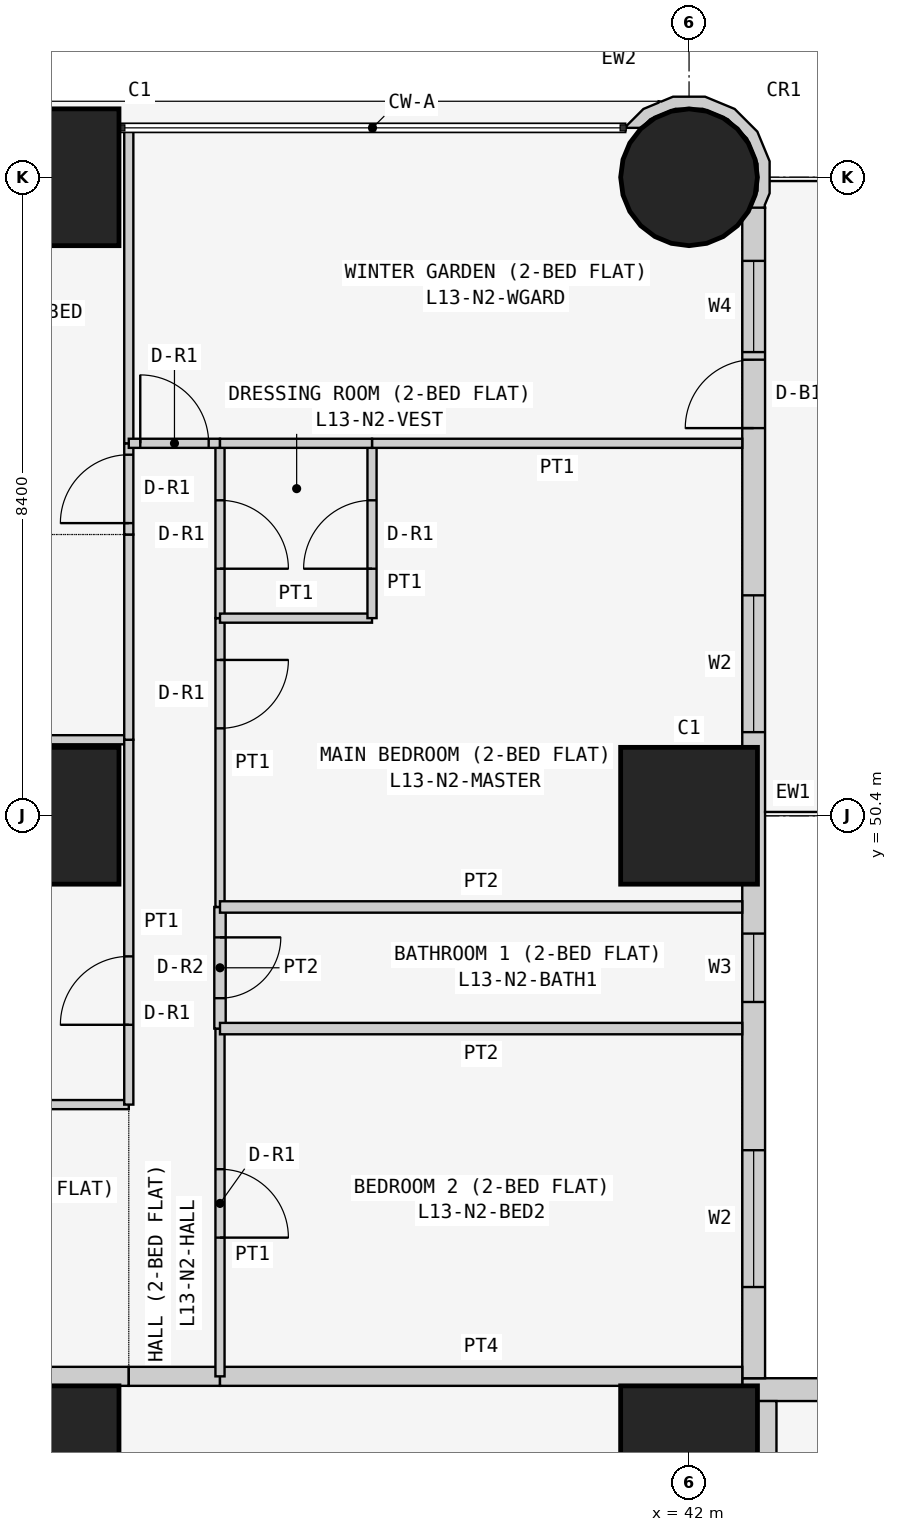
"""IFC4 building model, lengths in metres.
Left out: names, types, materials, properties, quantities, classifications, styles, units other than length and angle.
Written with IfcOpenShell. Run it as: python <this file> out.ifc"""

import sys

from ifc_helpers import new_model, si_unit, direction, frame, frame_2d, origin, origin_2d, place, context, subcontext, project, spatial, polyline, rectangle, circle, outline, extrude, element, fill, save


model = new_model("IFC4")
c1 = context("Model", 3, precision=1e-05, world=origin(), true_north=direction((0.0, 1.0)))
c2 = subcontext(c1, "Body", "Model", "MODEL_VIEW")
j1 = project(units=[si_unit("LENGTHUNIT", "METRE"), si_unit("PLANEANGLEUNIT", "RADIAN")], contexts=[c1])
p1 = place(None, origin())
s1 = spatial("IfcSite", under=j1, at=p1, CompositionType="ELEMENT")
p2 = place(p1, origin())
s2 = spatial("IfcBuilding", under=s1, at=p2, CompositionType="ELEMENT")
p3 = place(p2, frame((0.0, 0.0, 56.1)))
s3 = spatial("IfcBuildingStorey", under=s2, at=p3, CompositionType="ELEMENT", Elevation=56.1)
for number, where, z_axis, x_axis in (
    (1, (33.6, 42.0, 0.0), (0.0, 0.0, 1.0), (1.0, 0.0, 0.0)),
    (2, (33.6, 50.4, 0.0), (0.0, 0.0, 1.0), (1.0, 0.0, 0.0)),
    (3, (33.6, 58.8, 0.0), (0.0, 0.0, 1.0), (1.0, 0.0, 0.0)),
    (4, (42.0, 42.0, 0.0), (0.0, 0.0, 1.0), (1.0, 0.0, 0.0)),
    (5, (42.0, 50.4, 0.0), (0.0, 0.0, 1.0), (1.0, 0.0, 0.0)),
):
    element("IfcColumn", number, at=place(p3, frame(where, z_axis=z_axis, x_axis=x_axis)), inside=s3, PredefinedType="COLUMN", context=c2, shape_type="SweptSolid", body=[
        extrude(rectangle(XDim=1.8, YDim=1.8, at=origin_2d()), origin(), (0.0, 0.0, 1.0), 3.6),
    ])
p4 = place(p3, frame((42.0, 58.8, 0.0), z_axis=(0.0, 0.0, 1.0), x_axis=(1.0, 0.0, 0.0)))
e6 = element("IfcColumn", 6, at=p4, inside=s3, PredefinedType="COLUMN", context=c2, shape_type="SweptSolid", body=[
    extrude(circle(Radius=0.9, at=origin_2d()), origin(), (0.0, 0.0, 1.0), 3.6),
])
p5 = place(p3, frame((58.4, 42.85, 0.0), z_axis=(0.0, 0.0, 1.0), x_axis=(-1.0, 0.0, 0.0)))
e7 = element("IfcWall", 7, at=p5, inside=s3, PredefinedType="SOLIDWALL", context=c2, shape_type="SweptSolid", body=[
    extrude(rectangle(XDim=15.7, YDim=0.3, at=frame_2d((7.85, 0.0))), origin(), (0.0, 0.0, 1.0), 3.45),
])
p6 = place(p5, frame((12.4, 0.0, 0.9)))
e8 = element("IfcOpeningElement", 8, at=p6, cuts=e7, PredefinedType="OPENING", context=c2, shape_type="SweptSolid", body=[
    extrude(rectangle(XDim=1.8, YDim=1.5, at=frame_2d((0.9, 0.75))), frame((0.0, 0.16, 0.0), z_axis=(0.0, -1.0, 0.0), x_axis=(1.0, 0.0, 0.0)), (0.0, 0.0, 1.0), 0.32),
])
p7 = place(p5, frame((9.55, 0.0, 1.5)))
e9 = element("IfcOpeningElement", 9, at=p7, cuts=e7, PredefinedType="OPENING", context=c2, shape_type="SweptSolid", body=[
    extrude(rectangle(XDim=0.9, YDim=0.7, at=frame_2d((0.45, 0.35))), frame((0.0, 0.16, 0.0), z_axis=(0.0, -1.0, 0.0), x_axis=(1.0, 0.0, 0.0)), (0.0, 0.0, 1.0), 0.32),
])
p8 = place(p5, frame((5.1, 0.0, 0.9)))
e10 = element("IfcOpeningElement", 10, at=p8, cuts=e7, PredefinedType="OPENING", context=c2, shape_type="SweptSolid", body=[
    extrude(rectangle(XDim=1.8, YDim=1.5, at=frame_2d((0.9, 0.75))), frame((0.0, 0.16, 0.0), z_axis=(0.0, -1.0, 0.0), x_axis=(1.0, 0.0, 0.0)), (0.0, 0.0, 1.0), 0.32),
])
p9 = place(p5, frame((2.0, 0.0, 0.0)))
e11 = element("IfcOpeningElement", 11, at=p9, cuts=e7, PredefinedType="OPENING", context=c2, shape_type="SweptSolid", body=[
    extrude(rectangle(XDim=0.9, YDim=2.4, at=frame_2d((0.45, 1.2))), frame((0.0, 0.16, 0.0), z_axis=(0.0, -1.0, 0.0), x_axis=(1.0, 0.0, 0.0)), (0.0, 0.0, 1.0), 0.32),
])
p10 = place(p5, frame((0.7, 0.0, 0.9)))
e12 = element("IfcOpeningElement", 12, at=p10, cuts=e7, PredefinedType="OPENING", context=c2, shape_type="SweptSolid", body=[
    extrude(rectangle(XDim=1.2, YDim=1.5, at=frame_2d((0.6, 0.75))), frame((0.0, 0.16, 0.0), z_axis=(0.0, -1.0, 0.0), x_axis=(1.0, 0.0, 0.0)), (0.0, 0.0, 1.0), 0.32),
])
p11 = place(p3, frame((42.85, 43.0, 0.0), z_axis=(0.0, 0.0, 1.0), x_axis=(0.0, 1.0, 0.0)))
e13 = element("IfcWall", 13, at=p11, inside=s3, PredefinedType="SOLIDWALL", context=c2, shape_type="SweptSolid", body=[
    extrude(rectangle(XDim=15.4, YDim=0.3, at=frame_2d((7.7, 0.0))), origin(), (0.0, 0.0, 1.0), 3.45),
])
p12 = place(p11, frame((1.2, 0.0, 0.9)))
e14 = element("IfcOpeningElement", 14, at=p12, cuts=e13, PredefinedType="OPENING", context=c2, shape_type="SweptSolid", body=[
    extrude(rectangle(XDim=1.8, YDim=1.5, at=frame_2d((0.9, 0.75))), frame((0.0, 0.16, 0.0), z_axis=(0.0, -1.0, 0.0), x_axis=(1.0, 0.0, 0.0)), (0.0, 0.0, 1.0), 0.32),
])
p13 = place(p11, frame((4.95, 0.0, 1.5)))
e15 = element("IfcOpeningElement", 15, at=p13, cuts=e13, PredefinedType="OPENING", context=c2, shape_type="SweptSolid", body=[
    extrude(rectangle(XDim=0.9, YDim=0.7, at=frame_2d((0.45, 0.35))), frame((0.0, 0.16, 0.0), z_axis=(0.0, -1.0, 0.0), x_axis=(1.0, 0.0, 0.0)), (0.0, 0.0, 1.0), 0.32),
])
p14 = place(p11, frame((8.5, 0.0, 0.9)))
e16 = element("IfcOpeningElement", 16, at=p14, cuts=e13, PredefinedType="OPENING", context=c2, shape_type="SweptSolid", body=[
    extrude(rectangle(XDim=1.8, YDim=1.5, at=frame_2d((0.9, 0.75))), frame((0.0, 0.16, 0.0), z_axis=(0.0, -1.0, 0.0), x_axis=(1.0, 0.0, 0.0)), (0.0, 0.0, 1.0), 0.32),
])
p15 = place(p11, frame((12.5, 0.0, 0.0)))
e17 = element("IfcOpeningElement", 17, at=p15, cuts=e13, PredefinedType="OPENING", context=c2, shape_type="SweptSolid", body=[
    extrude(rectangle(XDim=0.9, YDim=2.4, at=frame_2d((0.45, 1.2))), frame((0.0, 0.16, 0.0), z_axis=(0.0, -1.0, 0.0), x_axis=(1.0, 0.0, 0.0)), (0.0, 0.0, 1.0), 0.32),
])
p16 = place(p11, frame((13.5, 0.0, 0.9)))
e18 = element("IfcOpeningElement", 18, at=p16, cuts=e13, PredefinedType="OPENING", context=c2, shape_type="SweptSolid", body=[
    extrude(rectangle(XDim=1.2, YDim=1.5, at=frame_2d((0.6, 0.75))), frame((0.0, 0.16, 0.0), z_axis=(0.0, -1.0, 0.0), x_axis=(1.0, 0.0, 0.0)), (0.0, 0.0, 1.0), 0.32),
])
p17 = place(p3, frame((42.91, 58.436, 0.0), z_axis=(0.0, 0.0, 1.0), x_axis=(0.377204953059, 0.926129809145, 0.0)))
e19 = element("IfcWall", 19, at=p17, inside=s3, PredefinedType="SOLIDWALL", context=c2, shape_type="SweptSolid", body=[
    extrude(outline(polyline([(0.769, 1.728), (0.75, 1.723), (0.6, 1.875), (0.295, 2.004), (0.281, 1.998), (0.36, 1.803), (0.509, 1.741), (0.761, 1.486), (0.896, 1.154), (0.894, 0.795), (0.755, 0.465), (0.5, 0.213), (0.168, 0.078), (-0.1, 0.08), (0.001, -0.097), (0.03, -0.08), (0.198, -0.081), (0.589, 0.078), (0.889, 0.374), (1.052, 0.763), (1.055, 1.185), (0.896, 1.575), (0.778, 1.695), (0.769, 1.728)])), origin(), (0.0, 0.0, 1.0), 3.45),
])
p18 = place(p3, frame((29.4, 43.025, 0.0), z_axis=(0.0, 0.0, 1.0), x_axis=(1.0, 0.0, 0.0)))
e20 = element("IfcWall", 20, at=p18, inside=s3, PredefinedType="PARTITIONING", context=c2, shape_type="SweptSolid", body=[
    extrude(rectangle(XDim=5.229, YDim=0.25, at=frame_2d((2.615, 0.0))), origin(), (0.0, 0.0, 1.0), 3.45),
])
p19 = place(p18, frame((2.1, 0.0, 0.0)))
e21 = element("IfcOpeningElement", 21, at=p19, cuts=e20, PredefinedType="OPENING", context=c2, shape_type="SweptSolid", body=[
    extrude(rectangle(XDim=1.0, YDim=2.1, at=frame_2d((0.5, 1.05))), frame((0.0, 0.135, 0.0), z_axis=(0.0, -1.0, 0.0), x_axis=(1.0, 0.0, 0.0)), (0.0, 0.0, 1.0), 0.27),
])
p20 = place(p3, frame((34.629, 43.025, 0.0), z_axis=(0.0, 0.0, 1.0), x_axis=(1.0, 0.0, 0.0)))
e22 = element("IfcWall", 22, at=p20, inside=s3, PredefinedType="PARTITIONING", context=c2, shape_type="SweptSolid", body=[
    extrude(rectangle(XDim=1.2, YDim=0.25, at=frame_2d((0.6, 0.0))), origin(), (0.0, 0.0, 1.0), 3.45),
])
for number, where, z_axis, x_axis in (
    (23, (35.829, 43.025, 0.0), (0.0, 0.0, 1.0), (1.0, 0.0, 0.0)),
    (24, (43.025, 42.7, 0.0), (0.0, 0.0, 1.0), (0.0, -1.0, 0.0)),
):
    element("IfcWall", number, at=place(p3, frame(where, z_axis=z_axis, x_axis=x_axis)), inside=s3, PredefinedType="PARTITIONING", context=c2, shape_type="SweptSolid", body=[
        extrude(rectangle(XDim=6.871, YDim=0.25, at=frame_2d((3.436, 0.0))), origin(), (0.0, 0.0, 1.0), 3.45),
    ])
for number, where, z_axis, x_axis in (
    (25, (29.4, 46.6, 0.0), (0.0, 0.0, 1.0), (1.0, 0.0, 0.0)),
    (26, (29.4, 51.4, 0.0), (0.0, 0.0, 1.0), (1.0, 0.0, 0.0)),
):
    element("IfcWall", number, at=place(p3, frame(where, z_axis=z_axis, x_axis=x_axis)), inside=s3, PredefinedType="PARTITIONING", context=c2, shape_type="SweptSolid", body=[
        extrude(rectangle(XDim=5.229, YDim=0.12, at=frame_2d((2.615, 0.0))), origin(), (0.0, 0.0, 1.0), 3.45),
    ])
p21 = place(p3, frame((34.629, 51.4, 0.0), z_axis=(0.0, 0.0, 1.0), x_axis=(0.0, -1.0, 0.0)))
e27 = element("IfcWall", 27, at=p21, inside=s3, PredefinedType="PARTITIONING", context=c2, shape_type="SweptSolid", body=[
    extrude(rectangle(XDim=4.8, YDim=0.12, at=frame_2d((2.4, 0.0))), origin(), (0.0, 0.0, 1.0), 3.45),
])
p22 = place(p21, frame((2.85, 0.0, 0.0)))
e28 = element("IfcOpeningElement", 28, at=p22, cuts=e27, PredefinedType="OPENING", context=c2, shape_type="SweptSolid", body=[
    extrude(rectangle(XDim=0.9, YDim=2.1, at=frame_2d((0.45, 1.05))), frame((0.0, 0.07, 0.0), z_axis=(0.0, -1.0, 0.0), x_axis=(1.0, 0.0, 0.0)), (0.0, 0.0, 1.0), 0.14),
])
p23 = place(p3, frame((34.629, 54.1, 0.0), z_axis=(0.0, 0.0, 1.0), x_axis=(0.0, -1.0, 0.0)))
e29 = element("IfcWall", 29, at=p23, inside=s3, PredefinedType="PARTITIONING", context=c2, shape_type="SweptSolid", body=[
    extrude(rectangle(XDim=2.7, YDim=0.12, at=frame_2d((1.35, 0.0))), origin(), (0.0, 0.0, 1.0), 3.45),
])
p24 = place(p3, frame((34.629, 55.3, 0.0), z_axis=(0.0, 0.0, 1.0), x_axis=(0.0, -1.0, 0.0)))
e30 = element("IfcWall", 30, at=p24, inside=s3, PredefinedType="PARTITIONING", context=c2, shape_type="SweptSolid", body=[
    extrude(rectangle(XDim=1.2, YDim=0.12, at=frame_2d((0.6, 0.0))), origin(), (0.0, 0.0, 1.0), 3.45),
])
p25 = place(p24, frame((0.15, 0.0, 0.0)))
e31 = element("IfcOpeningElement", 31, at=p25, cuts=e30, PredefinedType="OPENING", context=c2, shape_type="SweptSolid", body=[
    extrude(rectangle(XDim=0.9, YDim=2.1, at=frame_2d((0.45, 1.05))), frame((0.0, 0.07, 0.0), z_axis=(0.0, -1.0, 0.0), x_axis=(1.0, 0.0, 0.0)), (0.0, 0.0, 1.0), 0.14),
])
p26 = place(p3, frame((34.629, 59.45, 0.0), z_axis=(0.0, 0.0, 1.0), x_axis=(0.0, -1.0, 0.0)))
e32 = element("IfcWall", 32, at=p26, inside=s3, PredefinedType="PARTITIONING", context=c2, shape_type="SweptSolid", body=[
    extrude(rectangle(XDim=4.15, YDim=0.12, at=frame_2d((2.075, 0.0))), origin(), (0.0, 0.0, 1.0), 3.45),
])
p27 = place(p3, frame((35.829, 47.6, 0.0), z_axis=(0.0, 0.0, 1.0), x_axis=(0.0, -1.0, 0.0)))
e33 = element("IfcWall", 33, at=p27, inside=s3, PredefinedType="PARTITIONING", context=c2, shape_type="SweptSolid", body=[
    extrude(rectangle(XDim=4.575, YDim=0.12, at=frame_2d((2.288, 0.0))), origin(), (0.0, 0.0, 1.0), 3.45),
])
p28 = place(p27, frame((1.85, 0.0, 0.0)))
e34 = element("IfcOpeningElement", 34, at=p28, cuts=e33, PredefinedType="OPENING", context=c2, shape_type="SweptSolid", body=[
    extrude(rectangle(XDim=0.9, YDim=2.1, at=frame_2d((0.45, 1.05))), frame((0.0, 0.07, 0.0), z_axis=(0.0, -1.0, 0.0), x_axis=(1.0, 0.0, 0.0)), (0.0, 0.0, 1.0), 0.14),
])
p29 = place(p3, frame((35.829, 49.2, 0.0), z_axis=(0.0, 0.0, 1.0), x_axis=(0.0, -1.0, 0.0)))
e35 = element("IfcWall", 35, at=p29, inside=s3, PredefinedType="PARTITIONING", context=c2, shape_type="SweptSolid", body=[
    extrude(rectangle(XDim=1.6, YDim=0.15, at=frame_2d((0.8, 0.0))), origin(), (0.0, 0.0, 1.0), 3.45),
])
p30 = place(p29, frame((0.4, 0.0, 0.0)))
e36 = element("IfcOpeningElement", 36, at=p30, cuts=e35, PredefinedType="OPENING", context=c2, shape_type="SweptSolid", body=[
    extrude(rectangle(XDim=0.8, YDim=2.1, at=frame_2d((0.4, 1.05))), frame((0.0, 0.085, 0.0), z_axis=(0.0, -1.0, 0.0), x_axis=(1.0, 0.0, 0.0)), (0.0, 0.0, 1.0), 0.17),
])
p31 = place(p3, frame((35.829, 53.0, 0.0), z_axis=(0.0, 0.0, 1.0), x_axis=(0.0, -1.0, 0.0)))
e37 = element("IfcWall", 37, at=p31, inside=s3, PredefinedType="PARTITIONING", context=c2, shape_type="SweptSolid", body=[
    extrude(rectangle(XDim=3.8, YDim=0.12, at=frame_2d((1.9, 0.0))), origin(), (0.0, 0.0, 1.0), 3.45),
])
p32 = place(p31, frame((0.55, 0.0, 0.0)))
e38 = element("IfcOpeningElement", 38, at=p32, cuts=e37, PredefinedType="OPENING", context=c2, shape_type="SweptSolid", body=[
    extrude(rectangle(XDim=0.9, YDim=2.1, at=frame_2d((0.45, 1.05))), frame((0.0, 0.07, 0.0), z_axis=(0.0, -1.0, 0.0), x_axis=(1.0, 0.0, 0.0)), (0.0, 0.0, 1.0), 0.14),
])
p33 = place(p3, frame((35.829, 55.3, 0.0), z_axis=(0.0, 0.0, 1.0), x_axis=(0.0, -1.0, 0.0)))
e39 = element("IfcWall", 39, at=p33, inside=s3, PredefinedType="PARTITIONING", context=c2, shape_type="SweptSolid", body=[
    extrude(rectangle(XDim=2.3, YDim=0.12, at=frame_2d((1.15, 0.0))), origin(), (0.0, 0.0, 1.0), 3.45),
])
p34 = place(p33, frame((0.75, 0.0, 0.0)))
e40 = element("IfcOpeningElement", 40, at=p34, cuts=e39, PredefinedType="OPENING", context=c2, shape_type="SweptSolid", body=[
    extrude(rectangle(XDim=0.9, YDim=2.1, at=frame_2d((0.45, 1.05))), frame((0.0, 0.07, 0.0), z_axis=(0.0, -1.0, 0.0), x_axis=(1.0, 0.0, 0.0)), (0.0, 0.0, 1.0), 0.14),
])
p35 = place(p3, frame((34.629, 55.3, 0.0), z_axis=(0.0, 0.0, 1.0), x_axis=(1.0, 0.0, 0.0)))
e41 = element("IfcWall", 41, at=p35, inside=s3, PredefinedType="PARTITIONING", context=c2, shape_type="SweptSolid", body=[
    extrude(rectangle(XDim=1.2, YDim=0.12, at=frame_2d((0.6, 0.0))), origin(), (0.0, 0.0, 1.0), 3.45),
])
p36 = place(p35, frame((0.151, 0.0, 0.0)))
e42 = element("IfcOpeningElement", 42, at=p36, cuts=e41, PredefinedType="OPENING", context=c2, shape_type="SweptSolid", body=[
    extrude(rectangle(XDim=0.9, YDim=2.1, at=frame_2d((0.45, 1.05))), frame((0.0, 0.07, 0.0), z_axis=(0.0, -1.0, 0.0), x_axis=(1.0, 0.0, 0.0)), (0.0, 0.0, 1.0), 0.14),
])
for number, where, z_axis, x_axis in (
    (43, (35.829, 47.6, 0.0), (0.0, 0.0, 1.0), (1.0, 0.0, 0.0)),
    (44, (35.829, 49.2, 0.0), (0.0, 0.0, 1.0), (1.0, 0.0, 0.0)),
):
    element("IfcWall", number, at=place(p3, frame(where, z_axis=z_axis, x_axis=x_axis)), inside=s3, PredefinedType="PARTITIONING", context=c2, shape_type="SweptSolid", body=[
        extrude(rectangle(XDim=6.871, YDim=0.15, at=frame_2d((3.436, 0.0))), origin(), (0.0, 0.0, 1.0), 3.45),
    ])
p37 = place(p3, frame((35.829, 53.0, 0.0), z_axis=(0.0, 0.0, 1.0), x_axis=(1.0, 0.0, 0.0)))
e45 = element("IfcWall", 45, at=p37, inside=s3, PredefinedType="PARTITIONING", context=c2, shape_type="SweptSolid", body=[
    extrude(rectangle(XDim=2.0, YDim=0.12, at=frame_2d((1.0, 0.0))), origin(), (0.0, 0.0, 1.0), 3.45),
])
p38 = place(p3, frame((37.829, 53.0, 0.0), z_axis=(0.0, 0.0, 1.0), x_axis=(0.0, 1.0, 0.0)))
e46 = element("IfcWall", 46, at=p38, inside=s3, PredefinedType="PARTITIONING", context=c2, shape_type="SweptSolid", body=[
    extrude(rectangle(XDim=2.3, YDim=0.12, at=frame_2d((1.15, 0.0))), origin(), (0.0, 0.0, 1.0), 2.848),
])
p39 = place(p38, frame((0.65, 0.0, 0.0)))
e47 = element("IfcOpeningElement", 47, at=p39, cuts=e46, PredefinedType="OPENING", context=c2, shape_type="SweptSolid", body=[
    extrude(rectangle(XDim=0.9, YDim=2.1, at=frame_2d((0.45, 1.05))), frame((0.0, 0.07, 0.0), z_axis=(0.0, -1.0, 0.0), x_axis=(1.0, 0.0, 0.0)), (0.0, 0.0, 1.0), 0.14),
])
p40 = place(p3, frame((37.829, 55.3, 0.0), z_axis=(0.0, 0.0, 1.0), x_axis=(1.0, 0.0, 0.0)))
e48 = element("IfcWall", 48, at=p40, inside=s3, PredefinedType="PARTITIONING", context=c2, shape_type="SweptSolid", body=[
    extrude(rectangle(XDim=4.871, YDim=0.12, at=frame_2d((2.436, 0.0))), origin(), (0.0, 0.0, 1.0), 3.45),
])
p41 = place(p3, frame((35.829, 55.3, 0.0), z_axis=(0.0, 0.0, 1.0), x_axis=(1.0, 0.0, 0.0)))
e49 = element("IfcWall", 49, at=p41, inside=s3, PredefinedType="PARTITIONING", context=c2, shape_type="SweptSolid", body=[
    extrude(rectangle(XDim=2.0, YDim=0.12, at=frame_2d((1.0, 0.0))), origin(), (0.0, 0.0, 1.0), 3.45),
])
p42 = place(p12, origin())
e50 = element("IfcWindow", 50, at=p42, inside=s3, PartitioningType="SINGLE_PANEL", PredefinedType="WINDOW", context=c2, shape_type="SweptSolid", body=[
    extrude(rectangle(XDim=1.8, YDim=1.5, at=frame_2d((0.9, 0.75))), frame((0.0, 0.03, 0.0), z_axis=(0.0, -1.0, 0.0), x_axis=(1.0, 0.0, 0.0)), (0.0, 0.0, 1.0), 0.06),
])
fill(e14, e50)
p43 = place(p13, origin())
e51 = element("IfcWindow", 51, at=p43, inside=s3, PartitioningType="SINGLE_PANEL", PredefinedType="WINDOW", context=c2, shape_type="SweptSolid", body=[
    extrude(rectangle(XDim=0.9, YDim=0.7, at=frame_2d((0.45, 0.35))), frame((0.0, 0.03, 0.0), z_axis=(0.0, -1.0, 0.0), x_axis=(1.0, 0.0, 0.0)), (0.0, 0.0, 1.0), 0.06),
])
fill(e15, e51)
p44 = place(p14, origin())
e52 = element("IfcWindow", 52, at=p44, inside=s3, PartitioningType="SINGLE_PANEL", PredefinedType="WINDOW", context=c2, shape_type="SweptSolid", body=[
    extrude(rectangle(XDim=1.8, YDim=1.5, at=frame_2d((0.9, 0.75))), frame((0.0, 0.03, 0.0), z_axis=(0.0, -1.0, 0.0), x_axis=(1.0, 0.0, 0.0)), (0.0, 0.0, 1.0), 0.06),
])
fill(e16, e52)
p45 = place(p15, origin())
e53 = element("IfcDoor", 53, at=p45, inside=s3, OperationType="SINGLE_SWING_LEFT", PredefinedType="DOOR", context=c2, shape_type="SweptSolid", body=[
    extrude(rectangle(XDim=0.9, YDim=2.4, at=frame_2d((0.45, 1.2))), frame((0.0, 0.025, 0.0), z_axis=(0.0, -1.0, 0.0), x_axis=(1.0, 0.0, 0.0)), (0.0, 0.0, 1.0), 0.05),
])
fill(e17, e53)
p46 = place(p16, origin())
e54 = element("IfcWindow", 54, at=p46, inside=s3, PartitioningType="SINGLE_PANEL", PredefinedType="WINDOW", context=c2, shape_type="SweptSolid", body=[
    extrude(rectangle(XDim=1.2, YDim=1.5, at=frame_2d((0.6, 0.75))), frame((0.0, 0.03, 0.0), z_axis=(0.0, -1.0, 0.0), x_axis=(1.0, 0.0, 0.0)), (0.0, 0.0, 1.0), 0.06),
])
fill(e18, e54)
p47 = place(p22, frame((0.9, 0.0, 0.0), z_axis=(0.0, 0.0, 1.0), x_axis=(-1.0, 0.0, 0.0)))
e55 = element("IfcDoor", 55, at=p47, inside=s3, OperationType="SINGLE_SWING_LEFT", PredefinedType="DOOR", context=c2, shape_type="SweptSolid", body=[
    extrude(rectangle(XDim=0.9, YDim=2.1, at=frame_2d((0.45, 1.05))), frame((0.0, 0.025, 0.0), z_axis=(0.0, -1.0, 0.0), x_axis=(1.0, 0.0, 0.0)), (0.0, 0.0, 1.0), 0.05),
])
fill(e28, e55)
p48 = place(p25, frame((0.9, 0.0, 0.0), z_axis=(0.0, 0.0, 1.0), x_axis=(-1.0, 0.0, 0.0)))
e56 = element("IfcDoor", 56, at=p48, inside=s3, OperationType="SINGLE_SWING_LEFT", PredefinedType="DOOR", context=c2, shape_type="SweptSolid", body=[
    extrude(rectangle(XDim=0.9, YDim=2.1, at=frame_2d((0.45, 1.05))), frame((0.0, 0.025, 0.0), z_axis=(0.0, -1.0, 0.0), x_axis=(1.0, 0.0, 0.0)), (0.0, 0.0, 1.0), 0.05),
])
fill(e31, e56)
p49 = place(p28, origin())
e57 = element("IfcDoor", 57, at=p49, inside=s3, OperationType="SINGLE_SWING_RIGHT", PredefinedType="DOOR", context=c2, shape_type="SweptSolid", body=[
    extrude(rectangle(XDim=0.9, YDim=2.1, at=frame_2d((0.45, 1.05))), frame((0.0, 0.025, 0.0), z_axis=(0.0, -1.0, 0.0), x_axis=(1.0, 0.0, 0.0)), (0.0, 0.0, 1.0), 0.05),
])
fill(e34, e57)
p50 = place(p30, origin())
e58 = element("IfcDoor", 58, at=p50, inside=s3, OperationType="SINGLE_SWING_LEFT", PredefinedType="DOOR", context=c2, shape_type="SweptSolid", body=[
    extrude(rectangle(XDim=0.8, YDim=2.1, at=frame_2d((0.4, 1.05))), frame((0.0, 0.025, 0.0), z_axis=(0.0, -1.0, 0.0), x_axis=(1.0, 0.0, 0.0)), (0.0, 0.0, 1.0), 0.05),
])
fill(e36, e58)
p51 = place(p32, origin())
e59 = element("IfcDoor", 59, at=p51, inside=s3, OperationType="SINGLE_SWING_LEFT", PredefinedType="DOOR", context=c2, shape_type="SweptSolid", body=[
    extrude(rectangle(XDim=0.9, YDim=2.1, at=frame_2d((0.45, 1.05))), frame((0.0, 0.025, 0.0), z_axis=(0.0, -1.0, 0.0), x_axis=(1.0, 0.0, 0.0)), (0.0, 0.0, 1.0), 0.05),
])
fill(e38, e59)
p52 = place(p34, origin())
e60 = element("IfcDoor", 60, at=p52, inside=s3, OperationType="SINGLE_SWING_RIGHT", PredefinedType="DOOR", context=c2, shape_type="SweptSolid", body=[
    extrude(rectangle(XDim=0.9, YDim=2.1, at=frame_2d((0.45, 1.05))), frame((0.0, 0.025, 0.0), z_axis=(0.0, -1.0, 0.0), x_axis=(1.0, 0.0, 0.0)), (0.0, 0.0, 1.0), 0.05),
])
fill(e40, e60)
p53 = place(p39, origin())
e61 = element("IfcDoor", 61, at=p53, inside=s3, OperationType="SINGLE_SWING_LEFT", PredefinedType="DOOR", context=c2, shape_type="SweptSolid", body=[
    extrude(rectangle(XDim=0.9, YDim=2.1, at=frame_2d((0.45, 1.05))), frame((0.0, 0.025, 0.0), z_axis=(0.0, -1.0, 0.0), x_axis=(1.0, 0.0, 0.0)), (0.0, 0.0, 1.0), 0.05),
])
fill(e47, e61)
p54 = place(p36, origin())
e62 = element("IfcDoor", 62, at=p54, inside=s3, OperationType="SINGLE_SWING_LEFT", PredefinedType="DOOR", context=c2, shape_type="SweptSolid", body=[
    extrude(rectangle(XDim=0.9, YDim=2.1, at=frame_2d((0.45, 1.05))), frame((0.0, 0.025, 0.0), z_axis=(0.0, -1.0, 0.0), x_axis=(1.0, 0.0, 0.0)), (0.0, 0.0, 1.0), 0.05),
])
fill(e42, e62)
save(model, sys.argv[1])
